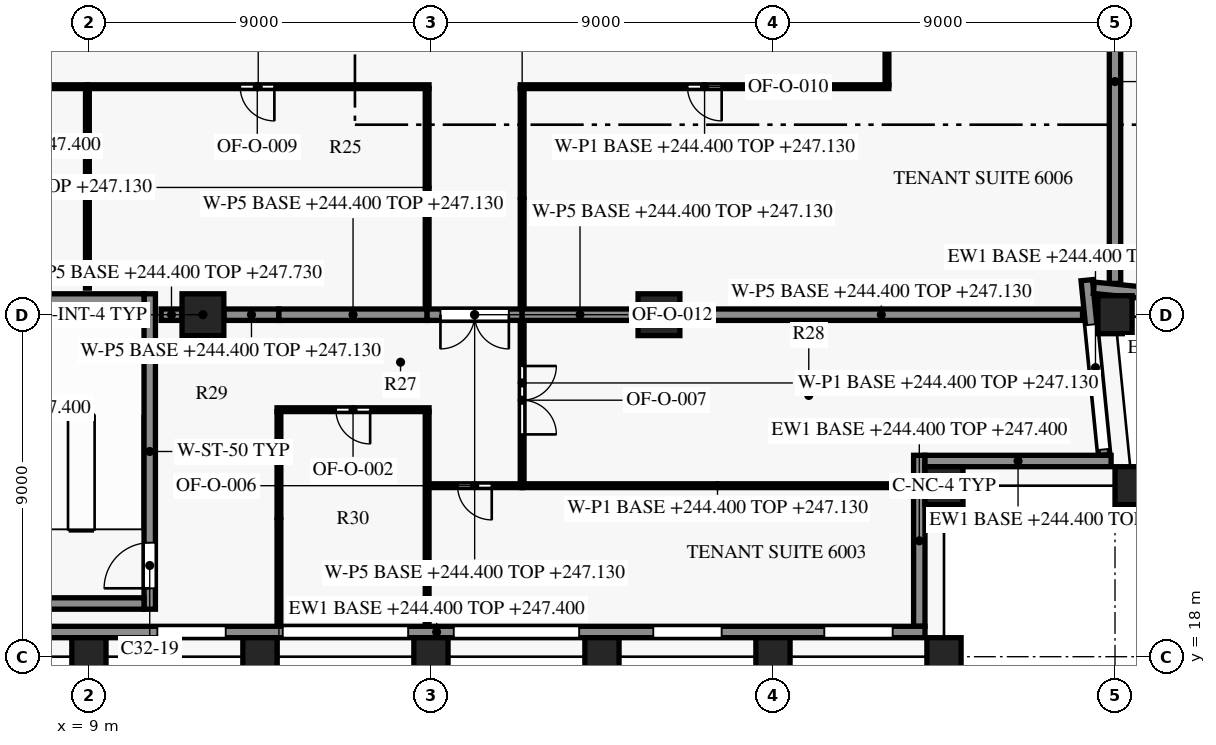
"""IFC4 building model, lengths in metres.
Left out: names, types, materials, properties, quantities, classifications, styles, units other than length and angle.
Written with IfcOpenShell. Run it as: python <this file> out.ifc"""

import sys

from ifc_helpers import new_model, si_unit, direction, frame, frame_2d, origin, origin_2d, place, context, subcontext, project, spatial, rectangle, extrude, element, fill, save


model = new_model("IFC4")
c1 = context("Model", 3, precision=1e-05, world=origin(), true_north=direction((0.0, 1.0)))
c2 = subcontext(c1, "Body", "Model", "MODEL_VIEW")
j1 = project(units=[si_unit("LENGTHUNIT", "METRE"), si_unit("PLANEANGLEUNIT", "RADIAN")], contexts=[c1])
p1 = place(None, origin())
s1 = spatial("IfcSite", under=j1, at=p1, CompositionType="ELEMENT")
p2 = place(p1, origin())
s2 = spatial("IfcBuilding", under=s1, at=p2, CompositionType="ELEMENT")
p3 = place(p2, frame((0.0, 0.0, 244.4)))
s3 = spatial("IfcBuildingStorey", under=s2, at=p3, CompositionType="ELEMENT", Elevation=244.4)
for number, where, z_axis, x_axis in (
    (1, (9.0, 18.0, 0.0), (0.0, 0.0, 1.0), (1.0, 0.0, 0.0)),
    (2, (13.5, 18.0, 0.0), (0.0, 0.0, 1.0), (1.0, 0.0, 0.0)),
    (3, (18.0, 18.0, 0.0), (0.0, 0.0, 1.0), (1.0, 0.0, 0.0)),
    (4, (22.5, 18.0, 0.0), (0.0, 0.0, 1.0), (1.0, 0.0, 0.0)),
    (5, (27.0, 18.0, 0.0), (0.0, 0.0, 1.0), (1.0, 0.0, 0.0)),
    (6, (31.5, 18.0, 0.0), (0.0, 0.0, 1.0), (1.0, 0.0, 0.0)),
    (7, (36.45, 22.5, 0.0), (0.0, 0.0, 1.0), (-0.1, 0.995, 0.0)),
    (8, (36.0, 27.0, 0.0), (0.0, 0.0, 1.0), (-0.1, 0.995, 0.0)),
):
    element("IfcColumn", number, at=place(p3, frame(where, z_axis=z_axis, x_axis=x_axis)), inside=s3, PredefinedType="COLUMN", context=c2, shape_type="SweptSolid", body=[
        extrude(rectangle(XDim=0.9, YDim=1.0, at=origin_2d()), origin(), (0.0, 0.0, 1.0), 3.8),
    ])
p4 = place(p3, frame((31.5, 22.5, 0.0), z_axis=(0.0, 0.0, 1.0), x_axis=(1.0, 0.0, 0.0)))
e9 = element("IfcColumn", 9, at=p4, inside=s3, PredefinedType="COLUMN", context=c2, shape_type="SweptSolid", body=[
    extrude(rectangle(XDim=1.0, YDim=1.0, at=origin_2d()), origin(), (0.0, 0.0, 1.0), 3.8),
])
for number, where, z_axis, x_axis in (
    (10, (12.0, 27.0, 0.0), (0.0, 0.0, 1.0), (1.0, 0.0, 0.0)),
    (11, (24.0, 27.0, 0.0), (0.0, 0.0, 1.0), (1.0, 0.0, 0.0)),
):
    element("IfcColumn", number, at=place(p3, frame(where, z_axis=z_axis, x_axis=x_axis)), inside=s3, PredefinedType="COLUMN", context=c2, shape_type="SweptSolid", body=[
        extrude(rectangle(XDim=1.1, YDim=1.1, at=origin_2d()), origin(), (0.0, 0.0, 1.0), 3.8),
    ])
p5 = place(p3, frame((31.0, 18.65, 0.0), z_axis=(0.0, 0.0, 1.0), x_axis=(-1.0, 0.0, 0.0)))
e12 = element("IfcWall", 12, at=p5, inside=s3, PredefinedType="SOLIDWALL", context=c2, shape_type="SweptSolid", body=[
    extrude(rectangle(XDim=25.7, YDim=0.3, at=frame_2d((12.85, 0.0))), origin(), (0.0, 0.0, 1.0), 3.0),
])
p6 = place(p5, frame((0.85, 0.0, 0.75)))
e13 = element("IfcOpeningElement", 13, at=p6, cuts=e12, PredefinedType="OPENING", context=c2, shape_type="SweptSolid", body=[
    extrude(rectangle(XDim=1.8, YDim=1.8, at=frame_2d((0.9, 0.9))), frame((0.0, 0.16, 0.0), z_axis=(0.0, -1.0, 0.0), x_axis=(1.0, 0.0, 0.0)), (0.0, 0.0, 1.0), 0.32),
])
p7 = place(p5, frame((5.35, 0.0, 0.75)))
e14 = element("IfcOpeningElement", 14, at=p7, cuts=e12, PredefinedType="OPENING", context=c2, shape_type="SweptSolid", body=[
    extrude(rectangle(XDim=1.8, YDim=1.8, at=frame_2d((0.9, 0.9))), frame((0.0, 0.16, 0.0), z_axis=(0.0, -1.0, 0.0), x_axis=(1.0, 0.0, 0.0)), (0.0, 0.0, 1.0), 0.32),
])
p8 = place(p5, frame((9.1, 0.0, 0.15)))
e15 = element("IfcOpeningElement", 15, at=p8, cuts=e12, PredefinedType="OPENING", context=c2, shape_type="SweptSolid", body=[
    extrude(rectangle(XDim=3.3, YDim=2.4, at=frame_2d((1.65, 1.2))), frame((0.0, 0.16, 0.0), z_axis=(0.0, -1.0, 0.0), x_axis=(1.0, 0.0, 0.0)), (0.0, 0.0, 1.0), 0.32),
])
p9 = place(p5, frame((13.6, 0.0, 0.15)))
e16 = element("IfcOpeningElement", 16, at=p9, cuts=e12, PredefinedType="OPENING", context=c2, shape_type="SweptSolid", body=[
    extrude(rectangle(XDim=3.3, YDim=2.4, at=frame_2d((1.65, 1.2))), frame((0.0, 0.16, 0.0), z_axis=(0.0, -1.0, 0.0), x_axis=(1.0, 0.0, 0.0)), (0.0, 0.0, 1.0), 0.32),
])
p10 = place(p5, frame((18.4, 0.0, 0.75)))
e17 = element("IfcOpeningElement", 17, at=p10, cuts=e12, PredefinedType="OPENING", context=c2, shape_type="SweptSolid", body=[
    extrude(rectangle(XDim=1.8, YDim=1.8, at=frame_2d((0.9, 0.9))), frame((0.0, 0.16, 0.0), z_axis=(0.0, -1.0, 0.0), x_axis=(1.0, 0.0, 0.0)), (0.0, 0.0, 1.0), 0.32),
])
p11 = place(p3, frame((30.85, 23.3, 0.0), z_axis=(0.0, 0.0, 1.0), x_axis=(0.0, -1.0, 0.0)))
e18 = element("IfcWall", 18, at=p11, inside=s3, PredefinedType="SOLIDWALL", context=c2, shape_type="SweptSolid", body=[
    extrude(rectangle(XDim=4.5, YDim=0.3, at=frame_2d((2.25, 0.0))), origin(), (0.0, 0.0, 1.0), 3.0),
])
p12 = place(p3, frame((35.897, 23.15, 0.0), z_axis=(0.0, 0.0, 1.0), x_axis=(-1.0, 0.0, 0.0)))
e19 = element("IfcWall", 19, at=p12, inside=s3, PredefinedType="SOLIDWALL", context=c2, shape_type="SweptSolid", body=[
    extrude(rectangle(XDim=4.897, YDim=0.3, at=frame_2d((2.449, 0.0))), origin(), (0.0, 0.0, 1.0), 3.0),
])
p13 = place(p3, frame((35.256, 27.908, 0.0), z_axis=(0.0, 0.0, 1.0), x_axis=(0.099535070904, -0.995034054523, 0.0)))
e20 = element("IfcWall", 20, at=p13, inside=s3, PredefinedType="SOLIDWALL", context=c2, shape_type="SweptSolid", body=[
    extrude(rectangle(XDim=4.626, YDim=0.3, at=frame_2d((2.313, 0.0))), origin(), (0.0, 0.0, 1.0), 3.0),
])
p14 = place(p13, frame((1.176, 0.0, 0.15)))
e21 = element("IfcOpeningElement", 21, at=p14, cuts=e20, PredefinedType="OPENING", context=c2, shape_type="SweptSolid", body=[
    extrude(rectangle(XDim=3.3, YDim=2.4, at=frame_2d((1.65, 1.2))), frame((0.0, 0.16, 0.0), z_axis=(0.0, -1.0, 0.0), x_axis=(1.0, 0.0, 0.0)), (0.0, 0.0, 1.0), 0.32),
])
p15 = place(p3, frame((45.015, 26.752, 0.0), z_axis=(0.0, 0.0, 1.0), x_axis=(-0.9950379439, 0.099496181828, 0.0)))
e22 = element("IfcWall", 22, at=p15, inside=s3, PredefinedType="SOLIDWALL", context=c2, shape_type="SweptSolid", body=[
    extrude(rectangle(XDim=9.621, YDim=0.3, at=frame_2d((4.811, 0.0))), origin(), (0.0, 0.0, 1.0), 3.0),
])
p16 = place(p15, frame((1.311, 0.0, 0.75)))
e23 = element("IfcOpeningElement", 23, at=p16, cuts=e22, PredefinedType="OPENING", context=c2, shape_type="SweptSolid", body=[
    extrude(rectangle(XDim=1.8, YDim=1.8, at=frame_2d((0.9, 0.9))), frame((0.0, 0.16, 0.0), z_axis=(0.0, -1.0, 0.0), x_axis=(1.0, 0.0, 0.0)), (0.0, 0.0, 1.0), 0.32),
])
p17 = place(p15, frame((5.083, 0.0, 0.15)))
e24 = element("IfcOpeningElement", 24, at=p17, cuts=e22, PredefinedType="OPENING", context=c2, shape_type="SweptSolid", body=[
    extrude(rectangle(XDim=3.3, YDim=2.4, at=frame_2d((1.65, 1.2))), frame((0.0, 0.16, 0.0), z_axis=(0.0, -1.0, 0.0), x_axis=(1.0, 0.0, 0.0)), (0.0, 0.0, 1.0), 0.32),
])
for number, where, z_axis, x_axis in (
    (25, (7.15, 19.4, 0.0), (0.0, 0.0, 1.0), (1.0, 0.0, 0.0)),
    (26, (7.15, 27.4, 0.0), (0.0, 0.0, 1.0), (1.0, 0.0, 0.0)),
):
    element("IfcWall", number, at=place(p3, frame(where, z_axis=z_axis, x_axis=x_axis)), inside=s3, PredefinedType="SHEAR", context=c2, shape_type="SweptSolid", body=[
        extrude(rectangle(XDim=3.3, YDim=0.3, at=frame_2d((1.65, 0.0))), origin(), (0.0, 0.0, 1.0), 3.5),
    ])
p18 = place(p3, frame((10.6, 19.25, 0.0), z_axis=(0.0, 0.0, 1.0), x_axis=(0.0, 1.0, 0.0)))
e27 = element("IfcWall", 27, at=p18, inside=s3, PredefinedType="SHEAR", context=c2, shape_type="SweptSolid", body=[
    extrude(rectangle(XDim=8.3, YDim=0.3, at=frame_2d((4.15, 0.0))), origin(), (0.0, 0.0, 1.0), 3.5),
])
p19 = place(p18, frame((0.55, 0.0, 0.0)))
e28 = element("IfcOpeningElement", 28, at=p19, cuts=e27, PredefinedType="OPENING", context=c2, shape_type="SweptSolid", body=[
    extrude(rectangle(XDim=1.2, YDim=2.2, at=frame_2d((0.6, 1.1))), frame((0.0, 0.16, 0.0), z_axis=(0.0, -1.0, 0.0), x_axis=(1.0, 0.0, 0.0)), (0.0, 0.0, 1.0), 0.32),
])
p20 = place(p3, frame((17.9, 22.45, 0.0), z_axis=(0.0, 0.0, 1.0), x_axis=(0.0, -1.0, 0.0)))
e29 = element("IfcWall", 29, at=p20, inside=s3, PredefinedType="PARTITIONING", context=c2, shape_type="SweptSolid", body=[
    extrude(rectangle(XDim=3.63, YDim=0.1, at=frame_2d((1.815, 0.0))), origin(), (0.0, 0.0, 1.0), 3.33),
])
p21 = place(p3, frame((20.4, 22.5, 0.0), z_axis=(0.0, 0.0, 1.0), x_axis=(-1.0, 0.0, 0.0)))
e30 = element("IfcWall", 30, at=p21, inside=s3, PredefinedType="PARTITIONING", context=c2, shape_type="SweptSolid", body=[
    extrude(rectangle(XDim=2.45, YDim=0.1, at=frame_2d((1.225, 0.0))), origin(), (0.0, 0.0, 1.0), 3.33),
])
p22 = place(p21, frame((0.8, 0.0, 0.0)))
e31 = element("IfcOpeningElement", 31, at=p22, cuts=e30, PredefinedType="OPENING", context=c2, shape_type="SweptSolid", body=[
    extrude(rectangle(XDim=0.9, YDim=2.1, at=frame_2d((0.45, 1.05))), frame((0.0, 0.06, 0.0), z_axis=(0.0, -1.0, 0.0), x_axis=(1.0, 0.0, 0.0)), (0.0, 0.0, 1.0), 0.12),
])
p23 = place(p3, frame((20.4, 22.5, 0.0), z_axis=(0.0, 0.0, 1.0), x_axis=(1.0, 0.0, 0.0)))
e32 = element("IfcWall", 32, at=p23, inside=s3, PredefinedType="PARTITIONING", context=c2, shape_type="SweptSolid", body=[
    extrude(rectangle(XDim=10.28, YDim=0.1, at=frame_2d((5.14, 0.0))), origin(), (0.0, 0.0, 1.0), 2.73),
])
p24 = place(p3, frame((17.9, 22.55, 0.0), z_axis=(0.0, 0.0, 1.0), x_axis=(0.0, 1.0, 0.0)))
e33 = element("IfcWall", 33, at=p24, inside=s3, PredefinedType="PARTITIONING", context=c2, shape_type="SweptSolid", body=[
    extrude(rectangle(XDim=1.9, YDim=0.1, at=frame_2d((0.95, 0.0))), origin(), (0.0, 0.0, 1.0), 3.33),
])
p25 = place(p3, frame((14.0, 24.45, 0.0), z_axis=(0.0, 0.0, 1.0), x_axis=(0.0, -1.0, 0.0)))
e34 = element("IfcWall", 34, at=p25, inside=s3, PredefinedType="PARTITIONING", context=c2, shape_type="SweptSolid", body=[
    extrude(rectangle(XDim=5.63, YDim=0.1, at=frame_2d((2.815, 0.0))), origin(), (0.0, 0.0, 1.0), 3.33),
])
p26 = place(p3, frame((17.95, 24.5, 0.0), z_axis=(0.0, 0.0, 1.0), x_axis=(-1.0, 0.0, 0.0)))
e35 = element("IfcWall", 35, at=p26, inside=s3, PredefinedType="PARTITIONING", context=c2, shape_type="SweptSolid", body=[
    extrude(rectangle(XDim=4.0, YDim=0.1, at=frame_2d((2.0, 0.0))), origin(), (0.0, 0.0, 1.0), 3.33),
])
p27 = place(p26, frame((1.55, 0.0, 0.0)))
e36 = element("IfcOpeningElement", 36, at=p27, cuts=e35, PredefinedType="OPENING", context=c2, shape_type="SweptSolid", body=[
    extrude(rectangle(XDim=0.9, YDim=2.1, at=frame_2d((0.45, 1.05))), frame((0.0, 0.06, 0.0), z_axis=(0.0, -1.0, 0.0), x_axis=(1.0, 0.0, 0.0)), (0.0, 0.0, 1.0), 0.12),
])
p28 = place(p3, frame((20.4, 26.83, 0.0), z_axis=(0.0, 0.0, 1.0), x_axis=(0.0, -1.0, 0.0)))
e37 = element("IfcWall", 37, at=p28, inside=s3, PredefinedType="PARTITIONING", context=c2, shape_type="SweptSolid", body=[
    extrude(rectangle(XDim=4.28, YDim=0.1, at=frame_2d((2.14, 0.0))), origin(), (0.0, 0.0, 1.0), 2.73),
])
p29 = place(p28, frame((1.18, 0.0, 0.0)))
e38 = element("IfcOpeningElement", 38, at=p29, cuts=e37, PredefinedType="OPENING", context=c2, shape_type="SweptSolid", body=[
    extrude(rectangle(XDim=1.8, YDim=2.1, at=frame_2d((0.9, 1.05))), frame((0.0, 0.06, 0.0), z_axis=(0.0, -1.0, 0.0), x_axis=(1.0, 0.0, 0.0)), (0.0, 0.0, 1.0), 0.12),
])
p30 = place(p3, frame((10.9, 27.0, 0.0), z_axis=(0.0, 0.0, 1.0), x_axis=(1.0, 0.0, 0.0)))
e39 = element("IfcWall", 39, at=p30, inside=s3, PredefinedType="PARTITIONING", context=c2, shape_type="SweptSolid", body=[
    extrude(rectangle(XDim=0.545, YDim=0.3, at=frame_2d((0.272, 0.0))), origin(), (0.0, 0.0, 1.0), 3.33),
])
p31 = place(p3, frame((12.555, 27.0, 0.0), z_axis=(0.0, 0.0, 1.0), x_axis=(1.0, 0.0, 0.0)))
e40 = element("IfcWall", 40, at=p31, inside=s3, PredefinedType="PARTITIONING", context=c2, shape_type="SweptSolid", body=[
    extrude(rectangle(XDim=1.445, YDim=0.3, at=frame_2d((0.723, 0.0))), origin(), (0.0, 0.0, 1.0), 2.73),
])
p32 = place(p3, frame((14.0, 27.0, 0.0), z_axis=(0.0, 0.0, 1.0), x_axis=(1.0, 0.0, 0.0)))
e41 = element("IfcWall", 41, at=p32, inside=s3, PredefinedType="PARTITIONING", context=c2, shape_type="SweptSolid", body=[
    extrude(rectangle(XDim=3.9, YDim=0.3, at=frame_2d((1.95, 0.0))), origin(), (0.0, 0.0, 1.0), 2.73),
])
p33 = place(p3, frame((20.4, 27.0, 0.0), z_axis=(0.0, 0.0, 1.0), x_axis=(-1.0, 0.0, 0.0)))
e42 = element("IfcWall", 42, at=p33, inside=s3, PredefinedType="PARTITIONING", context=c2, shape_type="SweptSolid", body=[
    extrude(rectangle(XDim=2.5, YDim=0.3, at=frame_2d((1.25, 0.0))), origin(), (0.0, 0.0, 1.0), 2.73),
])
p34 = place(p33, frame((0.35, 0.0, 0.0)))
e43 = element("IfcOpeningElement", 43, at=p34, cuts=e42, PredefinedType="OPENING", context=c2, shape_type="SweptSolid", body=[
    extrude(rectangle(XDim=1.8, YDim=2.1, at=frame_2d((0.9, 1.05))), frame((0.0, 0.16, 0.0), z_axis=(0.0, -1.0, 0.0), x_axis=(1.0, 0.0, 0.0)), (0.0, 0.0, 1.0), 0.32),
])
p35 = place(p3, frame((20.4, 27.0, 0.0), z_axis=(0.0, 0.0, 1.0), x_axis=(1.0, 0.0, 0.0)))
e44 = element("IfcWall", 44, at=p35, inside=s3, PredefinedType="PARTITIONING", context=c2, shape_type="SweptSolid", body=[
    extrude(rectangle(XDim=3.045, YDim=0.3, at=frame_2d((1.522, 0.0))), origin(), (0.0, 0.0, 1.0), 2.73),
])
p36 = place(p3, frame((24.555, 27.0, 0.0), z_axis=(0.0, 0.0, 1.0), x_axis=(1.0, 0.0, 0.0)))
e45 = element("IfcWall", 45, at=p36, inside=s3, PredefinedType="PARTITIONING", context=c2, shape_type="SweptSolid", body=[
    extrude(rectangle(XDim=10.591, YDim=0.3, at=frame_2d((5.295, 0.0))), origin(), (0.0, 0.0, 1.0), 2.73),
])
p37 = place(p3, frame((17.9, 27.17, 0.0), z_axis=(0.0, 0.0, 1.0), x_axis=(0.0, 1.0, 0.0)))
e46 = element("IfcWall", 46, at=p37, inside=s3, PredefinedType="PARTITIONING", context=c2, shape_type="SweptSolid", body=[
    extrude(rectangle(XDim=5.78, YDim=0.1, at=frame_2d((2.89, 0.0))), origin(), (0.0, 0.0, 1.0), 2.73),
])
p38 = place(p3, frame((36.0, 27.824, 0.0), z_axis=(0.0, 0.0, 1.0), x_axis=(0.0, 1.0, 0.0)))
e47 = element("IfcWall", 47, at=p38, inside=s3, PredefinedType="PARTITIONING", context=c2, shape_type="SweptSolid", body=[
    extrude(rectangle(XDim=10.621, YDim=0.3, at=frame_2d((5.311, 0.0))), origin(), (0.0, 0.0, 1.0), 2.73),
])
p39 = place(p3, frame((8.96, 32.95, 0.0), z_axis=(0.0, 0.0, 1.0), x_axis=(0.0, -1.0, 0.0)))
e48 = element("IfcWall", 48, at=p39, inside=s3, PredefinedType="PARTITIONING", context=c2, shape_type="SweptSolid", body=[
    extrude(rectangle(XDim=5.25, YDim=0.1, at=frame_2d((2.625, 0.0))), origin(), (0.0, 0.0, 1.0), 3.33),
])
p40 = place(p3, frame((20.4, 32.95, 0.0), z_axis=(0.0, 0.0, 1.0), x_axis=(0.0, -1.0, 0.0)))
e49 = element("IfcWall", 49, at=p40, inside=s3, PredefinedType="PARTITIONING", context=c2, shape_type="SweptSolid", body=[
    extrude(rectangle(XDim=5.78, YDim=0.1, at=frame_2d((2.89, 0.0))), origin(), (0.0, 0.0, 1.0), 2.73),
])
p41 = place(p3, frame((8.96, 33.0, 0.0), z_axis=(0.0, 0.0, 1.0), x_axis=(-1.0, 0.0, 0.0)))
e50 = element("IfcWall", 50, at=p41, inside=s3, PredefinedType="PARTITIONING", context=c2, shape_type="SweptSolid", body=[
    extrude(rectangle(XDim=2.51, YDim=0.1, at=frame_2d((1.255, 0.0))), origin(), (0.0, 0.0, 1.0), 3.33),
])
p42 = place(p3, frame((17.95, 33.0, 0.0), z_axis=(0.0, 0.0, 1.0), x_axis=(-1.0, 0.0, 0.0)))
e51 = element("IfcWall", 51, at=p42, inside=s3, PredefinedType="PARTITIONING", context=c2, shape_type="SweptSolid", body=[
    extrude(rectangle(XDim=8.99, YDim=0.1, at=frame_2d((4.495, 0.0))), origin(), (0.0, 0.0, 1.0), 2.73),
])
p43 = place(p42, frame((4.07, 0.0, 0.0)))
e52 = element("IfcOpeningElement", 52, at=p43, cuts=e51, PredefinedType="OPENING", context=c2, shape_type="SweptSolid", body=[
    extrude(rectangle(XDim=0.9, YDim=2.1, at=frame_2d((0.45, 1.05))), frame((0.0, 0.06, 0.0), z_axis=(0.0, -1.0, 0.0), x_axis=(1.0, 0.0, 0.0)), (0.0, 0.0, 1.0), 0.12),
])
p44 = place(p3, frame((30.05, 33.0, 0.0), z_axis=(0.0, 0.0, 1.0), x_axis=(-1.0, 0.0, 0.0)))
e53 = element("IfcWall", 53, at=p44, inside=s3, PredefinedType="PARTITIONING", context=c2, shape_type="SweptSolid", body=[
    extrude(rectangle(XDim=9.7, YDim=0.1, at=frame_2d((4.85, 0.0))), origin(), (0.0, 0.0, 1.0), 2.73),
])
p45 = place(p44, frame((4.4, 0.0, 0.0)))
e54 = element("IfcOpeningElement", 54, at=p45, cuts=e53, PredefinedType="OPENING", context=c2, shape_type="SweptSolid", body=[
    extrude(rectangle(XDim=0.9, YDim=2.1, at=frame_2d((0.45, 1.05))), frame((0.0, 0.06, 0.0), z_axis=(0.0, -1.0, 0.0), x_axis=(1.0, 0.0, 0.0)), (0.0, 0.0, 1.0), 0.12),
])
p46 = place(p3, frame((30.0, 44.94, 0.0), z_axis=(0.0, 0.0, 1.0), x_axis=(0.0, -1.0, 0.0)))
e55 = element("IfcWall", 55, at=p46, inside=s3, PredefinedType="PARTITIONING", context=c2, shape_type="SweptSolid", body=[
    extrude(rectangle(XDim=11.89, YDim=0.1, at=frame_2d((5.945, 0.0))), origin(), (0.0, 0.0, 1.0), 3.33),
])
p47 = place(p6, origin())
e56 = element("IfcWindow", 56, at=p47, inside=s3, PartitioningType="SINGLE_PANEL", PredefinedType="WINDOW", context=c2, shape_type="SweptSolid", body=[
    extrude(rectangle(XDim=1.8, YDim=1.8, at=frame_2d((0.9, 0.9))), frame((0.0, 0.03, 0.0), z_axis=(0.0, -1.0, 0.0), x_axis=(1.0, 0.0, 0.0)), (0.0, 0.0, 1.0), 0.06),
])
fill(e13, e56)
p48 = place(p7, origin())
e57 = element("IfcWindow", 57, at=p48, inside=s3, PartitioningType="SINGLE_PANEL", PredefinedType="WINDOW", context=c2, shape_type="SweptSolid", body=[
    extrude(rectangle(XDim=1.8, YDim=1.8, at=frame_2d((0.9, 0.9))), frame((0.0, 0.03, 0.0), z_axis=(0.0, -1.0, 0.0), x_axis=(1.0, 0.0, 0.0)), (0.0, 0.0, 1.0), 0.06),
])
fill(e14, e57)
p49 = place(p8, origin())
e58 = element("IfcWindow", 58, at=p49, inside=s3, PartitioningType="SINGLE_PANEL", PredefinedType="WINDOW", context=c2, shape_type="SweptSolid", body=[
    extrude(rectangle(XDim=3.3, YDim=2.4, at=frame_2d((1.65, 1.2))), frame((0.0, 0.03, 0.0), z_axis=(0.0, -1.0, 0.0), x_axis=(1.0, 0.0, 0.0)), (0.0, 0.0, 1.0), 0.06),
])
fill(e15, e58)
p50 = place(p9, origin())
e59 = element("IfcWindow", 59, at=p50, inside=s3, PartitioningType="SINGLE_PANEL", PredefinedType="WINDOW", context=c2, shape_type="SweptSolid", body=[
    extrude(rectangle(XDim=3.3, YDim=2.4, at=frame_2d((1.65, 1.2))), frame((0.0, 0.03, 0.0), z_axis=(0.0, -1.0, 0.0), x_axis=(1.0, 0.0, 0.0)), (0.0, 0.0, 1.0), 0.06),
])
fill(e16, e59)
p51 = place(p10, origin())
e60 = element("IfcWindow", 60, at=p51, inside=s3, PartitioningType="SINGLE_PANEL", PredefinedType="WINDOW", context=c2, shape_type="SweptSolid", body=[
    extrude(rectangle(XDim=1.8, YDim=1.8, at=frame_2d((0.9, 0.9))), frame((0.0, 0.03, 0.0), z_axis=(0.0, -1.0, 0.0), x_axis=(1.0, 0.0, 0.0)), (0.0, 0.0, 1.0), 0.06),
])
fill(e17, e60)
p52 = place(p14, origin())
e61 = element("IfcWindow", 61, at=p52, inside=s3, PartitioningType="SINGLE_PANEL", PredefinedType="WINDOW", context=c2, shape_type="SweptSolid", body=[
    extrude(rectangle(XDim=3.3, YDim=2.4, at=frame_2d((1.65, 1.2))), frame((0.0, 0.03, 0.0), z_axis=(0.0, -1.0, 0.0), x_axis=(1.0, 0.0, 0.0)), (0.0, 0.0, 1.0), 0.06),
])
fill(e21, e61)
p53 = place(p19, origin())
e62 = element("IfcDoor", 62, at=p53, inside=s3, OperationType="SINGLE_SWING_RIGHT", PredefinedType="DOOR", context=c2, shape_type="SweptSolid", body=[
    extrude(rectangle(XDim=1.2, YDim=2.2, at=frame_2d((0.6, 1.1))), frame((0.0, 0.025, 0.0), z_axis=(0.0, -1.0, 0.0), x_axis=(1.0, 0.0, 0.0)), (0.0, 0.0, 1.0), 0.05),
])
fill(e28, e62)
p54 = place(p27, origin())
e63 = element("IfcDoor", 63, at=p54, inside=s3, OperationType="SINGLE_SWING_RIGHT", PredefinedType="DOOR", context=c2, shape_type="SweptSolid", body=[
    extrude(rectangle(XDim=0.9, YDim=2.1, at=frame_2d((0.45, 1.05))), frame((0.0, 0.025, 0.0), z_axis=(0.0, -1.0, 0.0), x_axis=(1.0, 0.0, 0.0)), (0.0, 0.0, 1.0), 0.05),
])
fill(e36, e63)
p55 = place(p22, origin())
e64 = element("IfcDoor", 64, at=p55, inside=s3, OperationType="SINGLE_SWING_LEFT", PredefinedType="DOOR", context=c2, shape_type="SweptSolid", body=[
    extrude(rectangle(XDim=0.9, YDim=2.1, at=frame_2d((0.45, 1.05))), frame((0.0, 0.025, 0.0), z_axis=(0.0, -1.0, 0.0), x_axis=(1.0, 0.0, 0.0)), (0.0, 0.0, 1.0), 0.05),
])
fill(e31, e64)
p56 = place(p29, origin())
e65 = element("IfcDoor", 65, at=p56, inside=s3, OperationType="DOUBLE_DOOR_SINGLE_SWING", PredefinedType="DOOR", context=c2, shape_type="SweptSolid", body=[
    extrude(rectangle(XDim=1.8, YDim=2.1, at=frame_2d((0.9, 1.05))), frame((0.0, 0.025, 0.0), z_axis=(0.0, -1.0, 0.0), x_axis=(1.0, 0.0, 0.0)), (0.0, 0.0, 1.0), 0.05),
])
fill(e38, e65)
p57 = place(p43, origin())
e66 = element("IfcDoor", 66, at=p57, inside=s3, OperationType="SINGLE_SWING_RIGHT", PredefinedType="DOOR", context=c2, shape_type="SweptSolid", body=[
    extrude(rectangle(XDim=0.9, YDim=2.1, at=frame_2d((0.45, 1.05))), frame((0.0, 0.025, 0.0), z_axis=(0.0, -1.0, 0.0), x_axis=(1.0, 0.0, 0.0)), (0.0, 0.0, 1.0), 0.05),
])
fill(e52, e66)
p58 = place(p45, origin())
e67 = element("IfcDoor", 67, at=p58, inside=s3, OperationType="SINGLE_SWING_LEFT", PredefinedType="DOOR", context=c2, shape_type="SweptSolid", body=[
    extrude(rectangle(XDim=0.9, YDim=2.1, at=frame_2d((0.45, 1.05))), frame((0.0, 0.025, 0.0), z_axis=(0.0, -1.0, 0.0), x_axis=(1.0, 0.0, 0.0)), (0.0, 0.0, 1.0), 0.05),
])
fill(e54, e67)
p59 = place(p34, origin())
e68 = element("IfcDoor", 68, at=p59, inside=s3, OperationType="DOUBLE_DOOR_SINGLE_SWING", PredefinedType="DOOR", context=c2, shape_type="SweptSolid", body=[
    extrude(rectangle(XDim=1.8, YDim=2.1, at=frame_2d((0.9, 1.05))), frame((0.0, 0.025, 0.0), z_axis=(0.0, -1.0, 0.0), x_axis=(1.0, 0.0, 0.0)), (0.0, 0.0, 1.0), 0.05),
])
fill(e43, e68)
save(model, sys.argv[1])
